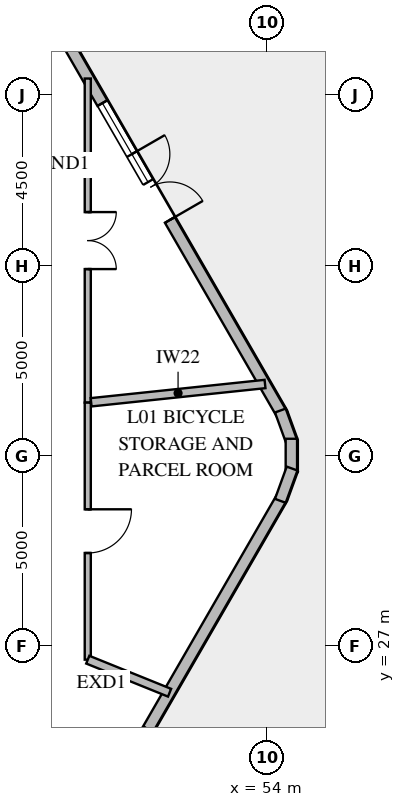
"""IFC4 building model, lengths in metres.
Left out: names, types, materials, properties, quantities, classifications, styles, units other than length and angle.
Written with IfcOpenShell. Run it as: python <this file> out.ifc"""

import sys

from ifc_helpers import new_model, si_unit, direction, frame, frame_2d, origin, place, context, subcontext, project, spatial, rectangle, extrude, element, fill, save


model = new_model("IFC4")
c1 = context("Model", 3, precision=1e-05, world=origin(), true_north=direction((0.0, 1.0)))
c2 = subcontext(c1, "Body", "Model", "MODEL_VIEW")
j1 = project(units=[si_unit("LENGTHUNIT", "METRE"), si_unit("PLANEANGLEUNIT", "RADIAN")], contexts=[c1])
p1 = place(None, origin())
s1 = spatial("IfcSite", under=j1, at=p1, CompositionType="ELEMENT")
p2 = place(p1, origin())
s2 = spatial("IfcBuilding", under=s1, at=p2, CompositionType="ELEMENT")
p3 = place(p2, origin())
s3 = spatial("IfcBuildingStorey", under=s2, at=p3, CompositionType="ELEMENT", Elevation=0.0)
p4 = place(p3, frame((54.398, 30.911, 0.0), z_axis=(0.0, 0.0, 1.0), x_axis=(-0.49999847728, -0.866026282926, 0.0)))
e1 = element("IfcWall", 1, at=p4, inside=s3, PredefinedType="SOLIDWALL", context=c2, shape_type="SweptSolid", body=[
    extrude(rectangle(XDim=16.512, YDim=0.3, at=frame_2d((8.256, 0.0))), origin(), (0.0, 0.0, 1.0), 5.95),
])
p5 = place(p4, frame((7.356, 0.0, 0.0)))
e2 = element("IfcOpeningElement", 2, at=p5, cuts=e1, PredefinedType="OPENING", context=c2, shape_type="SweptSolid", body=[
    extrude(rectangle(XDim=1.8, YDim=2.4, at=frame_2d((0.9, 1.2))), frame((0.0, 0.162, 0.0), z_axis=(0.0, -1.0, 0.0), x_axis=(1.0, 0.0, 0.0)), (0.0, 0.0, 1.0), 0.324),
])
p6 = place(p4, frame((7.056, 0.0, 4.5)))
e3 = element("IfcOpeningElement", 3, at=p6, cuts=e1, PredefinedType="OPENING", context=c2, shape_type="SweptSolid", body=[
    extrude(rectangle(XDim=2.4, YDim=1.6, at=frame_2d((1.2, 0.8))), frame((0.0, 0.162, 0.0), z_axis=(0.0, -1.0, 0.0), x_axis=(1.0, 0.0, 0.0)), (0.0, 0.0, 1.0), 0.324),
])
p7 = place(p3, frame((46.142, 47.389, 0.0), z_axis=(0.0, 0.0, 1.0), x_axis=(0.49999847728, -0.866026282926, 0.0)))
e4 = element("IfcWall", 4, at=p7, inside=s3, PredefinedType="SOLIDWALL", context=c2, shape_type="SweptSolid", body=[
    extrude(rectangle(XDim=16.512, YDim=0.3, at=frame_2d((8.256, 0.0))), origin(), (0.0, 0.0, 1.0), 5.95),
])
p8 = place(p7, frame((8.606, 0.0, 0.0)))
e5 = element("IfcOpeningElement", 5, at=p8, cuts=e4, PredefinedType="OPENING", context=c2, shape_type="SweptSolid", body=[
    extrude(rectangle(XDim=2.0, YDim=2.5, at=frame_2d((1.0, 1.25))), frame((0.0, 0.162, 0.0), z_axis=(0.0, -1.0, 0.0), x_axis=(1.0, 0.0, 0.0)), (0.0, 0.0, 1.0), 0.324),
])
p9 = place(p7, frame((7.056, 0.0, 4.5)))
e6 = element("IfcOpeningElement", 6, at=p9, cuts=e4, PredefinedType="OPENING", context=c2, shape_type="SweptSolid", body=[
    extrude(rectangle(XDim=2.4, YDim=1.6, at=frame_2d((1.2, 0.8))), frame((0.0, 0.162, 0.0), z_axis=(0.0, -1.0, 0.0), x_axis=(1.0, 0.0, 0.0)), (0.0, 0.0, 1.0), 0.324),
])
p10 = place(p3, frame((54.352, 33.188, 0.0), z_axis=(0.0, 0.0, 1.0), x_axis=(0.342198422728, -0.939627713237, 0.0)))
e7 = element("IfcWall", 7, at=p10, inside=s3, PredefinedType="SOLIDWALL", context=c2, shape_type="SweptSolid", body=[
    extrude(rectangle(XDim=0.904, YDim=0.3, at=frame_2d((0.452, 0.0))), origin(), (0.0, 0.0, 1.0), 7.35),
])
p11 = place(p3, frame((54.642, 32.445, 0.0), z_axis=(0.0, 0.0, 1.0), x_axis=(0.0, -1.0, 0.0)))
e8 = element("IfcWall", 8, at=p11, inside=s3, PredefinedType="SOLIDWALL", context=c2, shape_type="SweptSolid", body=[
    extrude(rectangle(XDim=0.891, YDim=0.3, at=frame_2d((0.445, 0.0))), origin(), (0.0, 0.0, 1.0), 7.35),
])
p12 = place(p3, frame((54.661, 31.661, 0.0), z_axis=(0.0, 0.0, 1.0), x_axis=(-0.342198422728, -0.939627713237, 0.0)))
e9 = element("IfcWall", 9, at=p12, inside=s3, PredefinedType="SOLIDWALL", context=c2, shape_type="SweptSolid", body=[
    extrude(rectangle(XDim=0.904, YDim=0.3, at=frame_2d((0.452, 0.0))), origin(), (0.0, 0.0, 1.0), 7.35),
])
p13 = place(p3, frame((49.285, 33.396, 0.0), z_axis=(0.0, 0.0, 1.0), x_axis=(0.0, 1.0, 0.0)))
e10 = element("IfcWall", 10, at=p13, inside=s3, PredefinedType="PARTITIONING", context=c2, shape_type="SweptSolid", body=[
    extrude(rectangle(XDim=8.529, YDim=0.16, at=frame_2d((4.264, 0.0))), origin(), (0.0, 0.0, 1.0), 5.95),
])
p14 = place(p13, frame((3.514, 0.0, 0.0)))
e11 = element("IfcOpeningElement", 11, at=p14, cuts=e10, PredefinedType="OPENING", context=c2, shape_type="SweptSolid", body=[
    extrude(rectangle(XDim=1.5, YDim=2.15, at=frame_2d((0.75, 1.075))), frame((0.0, 0.092, 0.0), z_axis=(0.0, -1.0, 0.0), x_axis=(1.0, 0.0, 0.0)), (0.0, 0.0, 1.0), 0.184),
])
p15 = place(p3, frame((49.285, 26.633, 0.0), z_axis=(0.0, 0.0, 1.0), x_axis=(0.0, 1.0, 0.0)))
e12 = element("IfcWall", 12, at=p15, inside=s3, PredefinedType="PARTITIONING", context=c2, shape_type="SweptSolid", body=[
    extrude(rectangle(XDim=6.764, YDim=0.16, at=frame_2d((3.382, 0.0))), origin(), (0.0, 0.0, 1.0), 5.95),
])
p16 = place(p15, frame((2.807, 0.0, 0.0)))
e13 = element("IfcOpeningElement", 13, at=p16, cuts=e12, PredefinedType="OPENING", context=c2, shape_type="SweptSolid", body=[
    extrude(rectangle(XDim=1.15, YDim=2.2, at=frame_2d((0.575, 1.1))), frame((0.0, 0.092, 0.0), z_axis=(0.0, -1.0, 0.0), x_axis=(1.0, 0.0, 0.0)), (0.0, 0.0, 1.0), 0.184),
])
p17 = place(p3, frame((49.373, 33.406, 0.0), z_axis=(0.0, 0.0, 1.0), x_axis=(0.994522302342, 0.104524591102, 0.0)))
e14 = element("IfcWall", 14, at=p17, inside=s3, PredefinedType="PARTITIONING", context=c2, shape_type="SweptSolid", body=[
    extrude(rectangle(XDim=4.601, YDim=0.22, at=frame_2d((2.301, 0.0))), origin(), (0.0, 0.0, 1.0), 7.35),
])
p18 = place(p3, frame((49.285, 26.633, 0.0), z_axis=(0.0, 0.0, 1.0), x_axis=(0.927194783694, -0.37457954174, 0.0)))
e15 = element("IfcWall", 15, at=p18, inside=s3, PredefinedType="PARTITIONING", context=c2, shape_type="SweptSolid", body=[
    extrude(rectangle(XDim=2.322, YDim=0.22, at=frame_2d((1.161, 0.0))), origin(), (0.0, 0.0, 1.0), 7.35),
])
p19 = place(p8, origin())
e16 = element("IfcDoor", 16, at=p19, inside=s3, OperationType="DOUBLE_DOOR_SINGLE_SWING", PredefinedType="DOOR", context=c2, shape_type="SweptSolid", body=[
    extrude(rectangle(XDim=2.0, YDim=2.5, at=frame_2d((1.0, 1.25))), frame((0.0, 0.025, 0.0), z_axis=(0.0, -1.0, 0.0), x_axis=(1.0, 0.0, 0.0)), (0.0, 0.0, 1.0), 0.05),
])
fill(e5, e16)
p20 = place(p9, origin())
e17 = element("IfcWindow", 17, at=p20, inside=s3, PartitioningType="SINGLE_PANEL", PredefinedType="WINDOW", context=c2, shape_type="SweptSolid", body=[
    extrude(rectangle(XDim=2.4, YDim=1.6, at=frame_2d((1.2, 0.8))), frame((0.0, 0.03, 0.0), z_axis=(0.0, -1.0, 0.0), x_axis=(1.0, 0.0, 0.0)), (0.0, 0.0, 1.0), 0.06),
])
fill(e6, e17)
p21 = place(p14, frame((1.5, 0.0, 0.0), z_axis=(0.0, 0.0, 1.0), x_axis=(-1.0, 0.0, 0.0)))
e18 = element("IfcDoor", 18, at=p21, inside=s3, OperationType="DOUBLE_DOOR_SINGLE_SWING", PredefinedType="DOOR", context=c2, shape_type="SweptSolid", body=[
    extrude(rectangle(XDim=1.5, YDim=2.15, at=frame_2d((0.75, 1.075))), frame((0.0, 0.025, 0.0), z_axis=(0.0, -1.0, 0.0), x_axis=(1.0, 0.0, 0.0)), (0.0, 0.0, 1.0), 0.05),
])
fill(e11, e18)
p22 = place(p16, frame((1.15, 0.0, 0.0), z_axis=(0.0, 0.0, 1.0), x_axis=(-1.0, 0.0, 0.0)))
e19 = element("IfcDoor", 19, at=p22, inside=s3, OperationType="SINGLE_SWING_LEFT", PredefinedType="DOOR", context=c2, shape_type="SweptSolid", body=[
    extrude(rectangle(XDim=1.15, YDim=2.2, at=frame_2d((0.575, 1.1))), frame((0.0, 0.025, 0.0), z_axis=(0.0, -1.0, 0.0), x_axis=(1.0, 0.0, 0.0)), (0.0, 0.0, 1.0), 0.05),
])
fill(e13, e19)
save(model, sys.argv[1])
